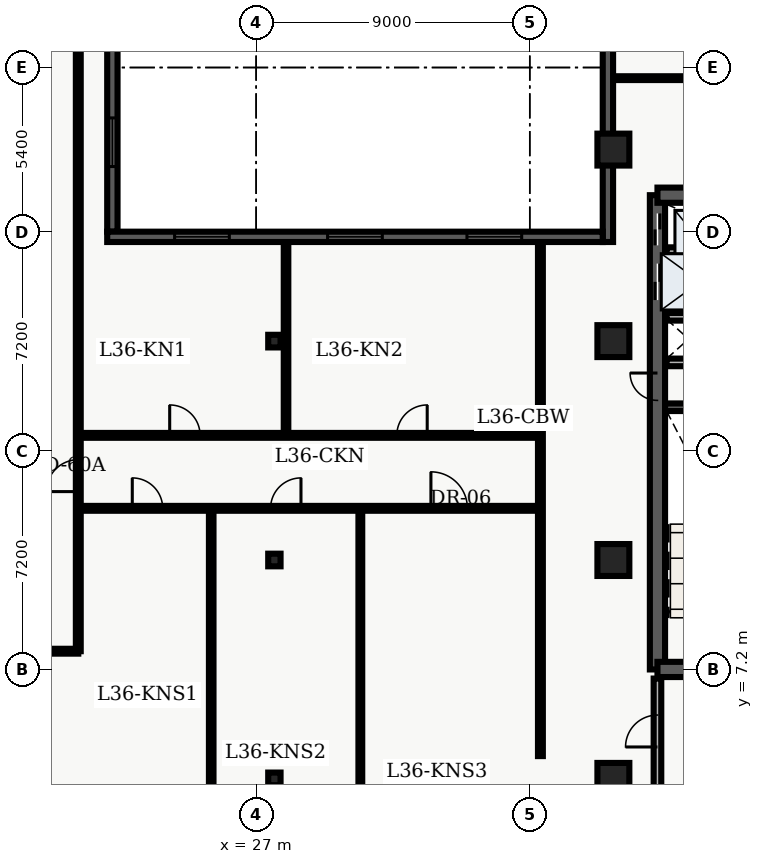
"""IFC4 building model, lengths in metres.
Left out: names, types, materials, properties, quantities, classifications, styles, units other than length and angle.
Written with IfcOpenShell. Run it as: python <this file> out.ifc"""

import sys

from ifc_helpers import new_model, entity, si_unit, converted_unit, direction, frame, origin_with_axes, origin_2d_with_axis, place, context, subcontext, project, spatial, polyline, rectangle, i_section, outline, extrude, element, fill, save


model = new_model("IFC4")
c1 = context("Model", 3, precision=1e-05, world=origin_with_axes(), true_north=direction((0.0, 1.0)))
c2 = subcontext(c1, "Body", "Model", "MODEL_VIEW")
j1 = project(units=[si_unit("LENGTHUNIT", "METRE"), converted_unit("PLANEANGLEUNIT", "DEGREE", entity("IfcPlaneAngleMeasure", 0.017), si_unit("PLANEANGLEUNIT", "RADIAN"), dimensions=[0, 0, 0, 0, 0, 0, 0])], contexts=[c1])
p1 = place(None, origin_with_axes())
s1 = spatial("IfcSite", under=j1, at=p1, CompositionType="ELEMENT")
p2 = place(p1, origin_with_axes())
s2 = spatial("IfcBuilding", under=s1, at=p2, CompositionType="ELEMENT")
p3 = place(p2, frame((0.0, 0.0, 148.5), z_axis=(0.0, 0.0, 1.0), x_axis=(1.0, 0.0, 0.0)))
s3 = spatial("IfcBuildingStorey", under=s2, at=p3, CompositionType="ELEMENT", Elevation=148.5)
p4 = place(p3, frame((40.2, 7.2, 0.0), z_axis=(0.0, 0.0, 1.0), x_axis=(0.0, 1.0, 0.0)))
e1 = element("IfcWall", 1, at=p4, inside=s3, PredefinedType="SHEAR", context=c2, shape_type="SweptSolid", body=[
    extrude(outline(polyline([(0.0, -0.25), (15.6, -0.25), (15.6, 0.25), (0.0, 0.25), (0.0, -0.25)])), origin_with_axes(), (0.0, 0.0, 1.0), 3.66),
])
p5 = place(p4, frame((14.475, 0.0, 0.0), z_axis=(0.0, 0.0, 1.0), x_axis=(1.0, 0.0, 0.0)))
e2 = element("IfcOpeningElement", 2, at=p5, cuts=e1, PredefinedType="OPENING", context=c2, shape_type="SweptSolid", body=[
    extrude(rectangle(XDim=1.05, YDim=0.52, at=origin_2d_with_axis()), origin_with_axes(), (0.0, 0.0, 1.0), 2.15),
])
p6 = place(p4, frame((12.75, 0.0, 0.0), z_axis=(0.0, 0.0, 1.0), x_axis=(1.0, 0.0, 0.0)))
e3 = element("IfcOpeningElement", 3, at=p6, cuts=e1, PredefinedType="OPENING", context=c2, shape_type="SweptSolid", body=[
    extrude(rectangle(XDim=1.2, YDim=0.52, at=origin_2d_with_axis()), origin_with_axes(), (0.0, 0.0, 1.0), 2.15),
])
p7 = place(p4, frame((9.3, 0.0, 0.0), z_axis=(0.0, 0.0, 1.0), x_axis=(1.0, 0.0, 0.0)))
e4 = element("IfcOpeningElement", 4, at=p7, cuts=e1, PredefinedType="OPENING", context=c2, shape_type="SweptSolid", body=[
    extrude(rectangle(XDim=0.9, YDim=0.52, at=origin_2d_with_axis()), origin_with_axes(), (0.0, 0.0, 1.0), 2.15),
])
p8 = place(p3, frame((40.2, 7.2, 0.0), z_axis=(0.0, 0.0, 1.0), x_axis=(1.0, 0.0, 0.0)))
e5 = element("IfcWall", 5, at=p8, inside=s3, PredefinedType="SHEAR", context=c2, shape_type="SweptSolid", body=[
    extrude(outline(polyline([(0.0, -0.25), (7.85, -0.25), (7.85, 0.25), (0.0, 0.25), (0.0, -0.25)])), origin_with_axes(), (0.0, 0.0, 1.0), 3.66),
])
p9 = place(p8, frame((2.175, 0.0, 0.0), z_axis=(0.0, 0.0, 1.0), x_axis=(1.0, 0.0, 0.0)))
e6 = element("IfcOpeningElement", 6, at=p9, cuts=e5, PredefinedType="OPENING", context=c2, shape_type="SweptSolid", body=[
    extrude(rectangle(XDim=1.05, YDim=0.52, at=origin_2d_with_axis()), origin_with_axes(), (0.0, 0.0, 1.0), 2.15),
])
p10 = place(p3, frame((40.2, 22.8, 0.0), z_axis=(0.0, 0.0, 1.0), x_axis=(1.0, 0.0, 0.0)))
e7 = element("IfcWall", 7, at=p10, inside=s3, PredefinedType="SHEAR", context=c2, shape_type="SweptSolid", body=[
    extrude(outline(polyline([(0.0, -0.25), (7.85, -0.25), (7.85, 0.25), (0.0, 0.25), (0.0, -0.25)])), origin_with_axes(), (0.0, 0.0, 1.0), 3.66),
])
p11 = place(p10, frame((5.775, 0.0, 0.0), z_axis=(0.0, 0.0, 1.0), x_axis=(1.0, 0.0, 0.0)))
e8 = element("IfcOpeningElement", 8, at=p11, cuts=e7, PredefinedType="OPENING", context=c2, shape_type="SweptSolid", body=[
    extrude(rectangle(XDim=1.05, YDim=0.52, at=origin_2d_with_axis()), origin_with_axes(), (0.0, 0.0, 1.0), 2.15),
])
p12 = place(p3, frame((40.45, 15.825, 0.0), z_axis=(0.0, 0.0, 1.0), x_axis=(1.0, 0.0, 0.0)))
e9 = element("IfcWall", 9, at=p12, inside=s3, PredefinedType="SHEAR", context=c2, shape_type="SweptSolid", body=[
    extrude(outline(polyline([(0.0, -0.125), (3.55, -0.125), (3.55, 0.125), (0.0, 0.125), (0.0, -0.125)])), origin_with_axes(), (0.0, 0.0, 1.0), 3.66),
])
p13 = place(p3, frame((40.5, 17.3, 0.0), z_axis=(0.0, 0.0, 1.0), x_axis=(1.0, 0.0, 0.0)))
e10 = element("IfcWall", 10, at=p13, inside=s3, PredefinedType="SOLIDWALL", context=c2, shape_type="SweptSolid", body=[
    extrude(outline(polyline([(0.0, -0.125), (3.5, -0.125), (3.5, 0.125), (0.0, 0.125), (0.0, -0.125)])), origin_with_axes(), (0.0, 0.0, 1.0), 2.7),
])
p14 = place(p13, frame((2.4, 0.0, 0.0), z_axis=(0.0, 0.0, 1.0), x_axis=(1.0, 0.0, 0.0)))
e11 = element("IfcOpeningElement", 11, at=p14, cuts=e10, PredefinedType="OPENING", context=c2, shape_type="SweptSolid", body=[
    extrude(rectangle(XDim=0.9, YDim=0.27, at=origin_2d_with_axis()), origin_with_axes(), (0.0, 0.0, 1.0), 2.15),
])
p15 = place(p3, frame((40.5, 18.8, 0.0), z_axis=(0.0, 0.0, 1.0), x_axis=(1.0, 0.0, 0.0)))
e12 = element("IfcWall", 12, at=p15, inside=s3, PredefinedType="SOLIDWALL", context=c2, shape_type="SweptSolid", body=[
    extrude(outline(polyline([(0.0, -0.125), (3.5, -0.125), (3.5, 0.125), (0.0, 0.125), (0.0, -0.125)])), origin_with_axes(), (0.0, 0.0, 1.0), 2.7),
])
p16 = place(p3, frame((40.2, 3.1, 0.0), z_axis=(0.0, 0.0, 1.0), x_axis=(0.0, 1.0, 0.0)))
e13 = element("IfcWall", 13, at=p16, inside=s3, PredefinedType="SOLIDWALL", context=c2, shape_type="SweptSolid", body=[
    extrude(outline(polyline([(0.0, -0.125), (3.8, -0.125), (3.8, 0.125), (0.0, 0.125), (0.0, -0.125)])), origin_with_axes(), (0.0, 0.0, 1.0), 2.7),
])
p17 = place(p16, frame((2.075, 0.0, 0.0), z_axis=(0.0, 0.0, 1.0), x_axis=(1.0, 0.0, 0.0)))
e14 = element("IfcOpeningElement", 14, at=p17, cuts=e13, PredefinedType="OPENING", context=c2, shape_type="SweptSolid", body=[
    extrude(rectangle(XDim=1.05, YDim=0.27, at=origin_2d_with_axis()), origin_with_axes(), (0.0, 0.0, 1.0), 2.15),
])
for number, where, z_axis, x_axis in (
    (15, (27.6, 3.6, 0.0), (0.0, 0.0, 1.0), (1.0, 0.0, 0.0)),
    (16, (27.6, 10.8, 0.0), (0.0, 0.0, 1.0), (1.0, 0.0, 0.0)),
    (17, (27.6, 18.0, 0.0), (0.0, 0.0, 1.0), (1.0, 0.0, 0.0)),
):
    element("IfcColumn", number, at=place(p3, frame(where, z_axis=z_axis, x_axis=x_axis)), inside=s3, PredefinedType="COLUMN", context=c2, shape_type="SweptSolid", body=[
        extrude(i_section(OverallWidth=0.406, OverallDepth=0.416, WebThickness=0.03, FlangeThickness=0.048, FilletRadius=0.022, at=origin_2d_with_axis()), origin_with_axes(), (0.0, 0.0, 1.0), 3.9),
    ])
for number, where, z_axis, x_axis in (
    (18, (38.75, 3.6, 0.0), (0.0, 0.0, 1.0), (1.0, 0.0, 0.0)),
    (19, (38.75, 10.8, 0.0), (0.0, 0.0, 1.0), (1.0, 0.0, 0.0)),
    (20, (38.75, 18.0, 0.0), (0.0, 0.0, 1.0), (1.0, 0.0, 0.0)),
    (21, (38.75, 24.3, 0.0), (0.0, 0.0, 1.0), (1.0, 0.0, 0.0)),
):
    element("IfcColumn", number, at=place(p3, frame(where, z_axis=z_axis, x_axis=x_axis)), inside=s3, PredefinedType="COLUMN", context=c2, shape_type="SweptSolid", body=[
        extrude(rectangle(XDim=1.05, YDim=1.05, at=origin_2d_with_axis()), origin_with_axes(), (0.0, 0.0, 1.0), 3.9),
    ])
p18 = place(p3, frame((40.5, 20.96, 0.0), z_axis=(0.0, 0.0, 1.0), x_axis=(1.0, 0.0, 0.0)))
e22 = element("IfcWall", 22, at=p18, inside=s3, PredefinedType="SOLIDWALL", context=c2, shape_type="SweptSolid", body=[
    extrude(outline(polyline([(0.0, -0.125), (3.5, -0.125), (3.5, 0.125), (0.0, 0.125), (0.0, -0.125)])), origin_with_axes(), (0.0, 0.0, 1.0), 2.7),
])
p19 = place(p3, frame((2.6, 7.8, 0.0), z_axis=(0.0, 0.0, 1.0), x_axis=(1.0, 0.0, 0.0)))
e23 = element("IfcWall", 23, at=p19, inside=s3, PredefinedType="PARTITIONING", context=c2, shape_type="SweptSolid", body=[
    extrude(outline(polyline([(0.0, -0.08), (18.55, -0.08), (18.55, 0.08), (0.0, 0.08), (0.0, -0.08)])), origin_with_axes(), (0.0, 0.0, 1.0), 2.7),
])
p20 = place(p19, frame((3.737, 0.0, 0.0), z_axis=(0.0, 0.0, 1.0), x_axis=(1.0, 0.0, 0.0)))
e24 = element("IfcOpeningElement", 24, at=p20, cuts=e23, PredefinedType="OPENING", context=c2, shape_type="SweptSolid", body=[
    extrude(rectangle(XDim=1.0, YDim=0.18, at=origin_2d_with_axis()), origin_with_axes(), (0.0, 0.0, 1.0), 2.15),
])
p21 = place(p19, frame((13.273, 0.0, 0.0), z_axis=(0.0, 0.0, 1.0), x_axis=(1.0, 0.0, 0.0)))
e25 = element("IfcOpeningElement", 25, at=p21, cuts=e23, PredefinedType="OPENING", context=c2, shape_type="SweptSolid", body=[
    extrude(rectangle(XDim=1.0, YDim=0.18, at=origin_2d_with_axis()), origin_with_axes(), (0.0, 0.0, 1.0), 2.15),
])
p22 = place(p3, frame((21.15, 7.8, 0.0), z_axis=(0.0, 0.0, 1.0), x_axis=(0.0, 1.0, 0.0)))
e26 = element("IfcWall", 26, at=p22, inside=s3, PredefinedType="PARTITIONING", context=c2, shape_type="SweptSolid", body=[
    extrude(outline(polyline([(0.0, -0.08), (32.7, -0.08), (32.7, 0.08), (0.0, 0.08), (0.0, -0.08)])), origin_with_axes(), (0.0, 0.0, 1.0), 2.7),
])
p23 = place(p22, frame((5.775, 0.0, 0.0), z_axis=(0.0, 0.0, 1.0), x_axis=(1.0, 0.0, 0.0)))
e27 = element("IfcOpeningElement", 27, at=p23, cuts=e26, PredefinedType="OPENING", context=c2, shape_type="SweptSolid", body=[
    extrude(rectangle(XDim=1.05, YDim=0.18, at=origin_2d_with_axis()), origin_with_axes(), (0.0, 0.0, 1.0), 2.15),
])
p24 = place(p3, frame((21.15, 12.5, 0.0), z_axis=(0.0, 0.0, 1.0), x_axis=(1.0, 0.0, 0.0)))
e28 = element("IfcWall", 28, at=p24, inside=s3, PredefinedType="PARTITIONING", context=c2, shape_type="SweptSolid", body=[
    extrude(outline(polyline([(0.0, -0.08), (15.2, -0.08), (15.2, 0.08), (0.0, 0.08), (0.0, -0.08)])), origin_with_axes(), (0.0, 0.0, 1.0), 2.7),
])
p25 = place(p24, frame((2.276, 0.0, 0.0), z_axis=(0.0, 0.0, 1.0), x_axis=(1.0, 0.0, 0.0)))
e29 = element("IfcOpeningElement", 29, at=p25, cuts=e28, PredefinedType="OPENING", context=c2, shape_type="SweptSolid", body=[
    extrude(rectangle(XDim=1.0, YDim=0.18, at=origin_2d_with_axis()), origin_with_axes(), (0.0, 0.0, 1.0), 2.15),
])
p26 = place(p24, frame((6.824, 0.0, 0.0), z_axis=(0.0, 0.0, 1.0), x_axis=(1.0, 0.0, 0.0)))
e30 = element("IfcOpeningElement", 30, at=p26, cuts=e28, PredefinedType="OPENING", context=c2, shape_type="SweptSolid", body=[
    extrude(rectangle(XDim=1.0, YDim=0.18, at=origin_2d_with_axis()), origin_with_axes(), (0.0, 0.0, 1.0), 2.15),
])
p27 = place(p24, frame((12.198, 0.0, 0.0), z_axis=(0.0, 0.0, 1.0), x_axis=(1.0, 0.0, 0.0)))
e31 = element("IfcOpeningElement", 31, at=p27, cuts=e28, PredefinedType="OPENING", context=c2, shape_type="SweptSolid", body=[
    extrude(rectangle(XDim=1.2, YDim=0.18, at=origin_2d_with_axis()), origin_with_axes(), (0.0, 0.0, 1.0), 2.2),
])
p28 = place(p3, frame((21.15, 14.9, 0.0), z_axis=(0.0, 0.0, 1.0), x_axis=(1.0, 0.0, 0.0)))
e32 = element("IfcWall", 32, at=p28, inside=s3, PredefinedType="PARTITIONING", context=c2, shape_type="SweptSolid", body=[
    extrude(outline(polyline([(0.0, -0.08), (15.2, -0.08), (15.2, 0.08), (0.0, 0.08), (0.0, -0.08)])), origin_with_axes(), (0.0, 0.0, 1.0), 2.7),
])
p29 = place(p28, frame((3.506, 0.0, 0.0), z_axis=(0.0, 0.0, 1.0), x_axis=(1.0, 0.0, 0.0)))
e33 = element("IfcOpeningElement", 33, at=p29, cuts=e32, PredefinedType="OPENING", context=c2, shape_type="SweptSolid", body=[
    extrude(rectangle(XDim=1.0, YDim=0.18, at=origin_2d_with_axis()), origin_with_axes(), (0.0, 0.0, 1.0), 2.15),
])
p30 = place(p28, frame((10.976, 0.0, 0.0), z_axis=(0.0, 0.0, 1.0), x_axis=(1.0, 0.0, 0.0)))
e34 = element("IfcOpeningElement", 34, at=p30, cuts=e32, PredefinedType="OPENING", context=c2, shape_type="SweptSolid", body=[
    extrude(rectangle(XDim=1.0, YDim=0.18, at=origin_2d_with_axis()), origin_with_axes(), (0.0, 0.0, 1.0), 2.15),
])
p31 = place(p3, frame((36.35, 4.35, 0.0), z_axis=(0.0, 0.0, 1.0), x_axis=(0.0, 1.0, 0.0)))
e35 = element("IfcWall", 35, at=p31, inside=s3, PredefinedType="PARTITIONING", context=c2, shape_type="SweptSolid", body=[
    extrude(outline(polyline([(0.0, -0.08), (16.95, -0.08), (16.95, 0.08), (0.0, 0.08), (0.0, -0.08)])), origin_with_axes(), (0.0, 0.0, 1.0), 2.7),
])
p32 = place(p3, frame((25.522, 0.335, 0.0), z_axis=(0.0, 0.0, 1.0), x_axis=(0.0, 1.0, 0.0)))
e36 = element("IfcWall", 36, at=p32, inside=s3, PredefinedType="PARTITIONING", context=c2, shape_type="SweptSolid", body=[
    extrude(outline(polyline([(0.0, -0.075), (12.045, -0.075), (12.045, 0.075), (0.0, 0.075), (0.0, -0.075)])), origin_with_axes(), (0.0, 0.0, 1.0), 2.7),
])
p33 = place(p3, frame((30.427, 0.335, 0.0), z_axis=(0.0, 0.0, 1.0), x_axis=(0.0, 1.0, 0.0)))
e37 = element("IfcWall", 37, at=p33, inside=s3, PredefinedType="PARTITIONING", context=c2, shape_type="SweptSolid", body=[
    extrude(outline(polyline([(0.0, -0.062), (12.045, -0.062), (12.045, 0.062), (0.0, 0.062), (0.0, -0.062)])), origin_with_axes(), (0.0, 0.0, 1.0), 2.7),
])
p34 = place(p3, frame((27.983, 15.02, 0.0), z_axis=(0.0, 0.0, 1.0), x_axis=(0.0, 1.0, 0.0)))
e38 = element("IfcWall", 38, at=p34, inside=s3, PredefinedType="PARTITIONING", context=c2, shape_type="SweptSolid", body=[
    extrude(outline(polyline([(0.0, -0.075), (6.245, -0.075), (6.245, 0.075), (0.0, 0.075), (0.0, -0.075)])), origin_with_axes(), (0.0, 0.0, 1.0), 2.7),
])
p35 = place(p3, frame((38.735, 26.65, 0.0), z_axis=(0.0, 0.0, 1.0), x_axis=(1.0, 0.0, 0.0)))
e39 = element("IfcWall", 39, at=p35, inside=s3, PredefinedType="PARTITIONING", context=c2, shape_type="SweptSolid", body=[
    extrude(outline(polyline([(0.0, -0.062), (20.905, -0.062), (20.905, 0.062), (0.0, 0.062), (0.0, -0.062)])), origin_with_axes(), (0.0, 0.0, 1.0), 2.7),
])
p36 = place(p35, frame((4.265, 0.0, 0.0), z_axis=(0.0, 0.0, 1.0), x_axis=(1.0, 0.0, 0.0)))
e40 = element("IfcOpeningElement", 40, at=p36, cuts=e39, PredefinedType="OPENING", context=c2, shape_type="SweptSolid", body=[
    extrude(rectangle(XDim=1.0, YDim=0.145, at=origin_2d_with_axis()), origin_with_axes(), (0.0, 0.0, 1.0), 2.15),
])
p37 = place(p3, frame((38.57, 21.26, 0.0), z_axis=(0.0, 0.0, 1.0), x_axis=(0.0, 1.0, 0.0)))
e41 = element("IfcWall", 41, at=p37, inside=s3, PredefinedType="SOLIDWALL", context=c2, shape_type="SweptSolid", body=[
    extrude(outline(polyline([(0.0, -0.17), (7.54, -0.17), (7.54, 0.17), (0.0, 0.17), (0.0, -0.17)])), origin_with_axes(), (0.0, 0.0, 1.0), 3.66),
])
p38 = place(p3, frame((22.271, 46.22, 0.0), z_axis=(0.0, 0.0, 1.0), x_axis=(0.0, -1.0, 0.0)))
e42 = element("IfcWall", 42, at=p38, inside=s3, PredefinedType="SOLIDWALL", context=c2, shape_type="SweptSolid", body=[
    extrude(outline(polyline([(0.0, -0.17), (24.62, -0.17), (24.62, 0.17), (0.0, 0.17), (0.0, -0.17)])), origin_with_axes(), (0.0, 0.0, 1.0), 3.66),
])
p39 = place(p38, frame((2.942, 0.0, 0.45), z_axis=(0.0, 0.0, 1.0), x_axis=(1.0, 0.0, 0.0)))
e43 = element("IfcOpeningElement", 43, at=p39, cuts=e42, PredefinedType="OPENING", context=c2, shape_type="SweptSolid", body=[
    extrude(rectangle(XDim=1.6, YDim=0.36, at=origin_2d_with_axis()), origin_with_axes(), (0.0, 0.0, 1.0), 2.2),
])
p40 = place(p38, frame((7.626, 0.0, 0.45), z_axis=(0.0, 0.0, 1.0), x_axis=(1.0, 0.0, 0.0)))
e44 = element("IfcOpeningElement", 44, at=p40, cuts=e42, PredefinedType="OPENING", context=c2, shape_type="SweptSolid", body=[
    extrude(rectangle(XDim=1.6, YDim=0.36, at=origin_2d_with_axis()), origin_with_axes(), (0.0, 0.0, 1.0), 2.2),
])
p41 = place(p38, frame((12.31, 0.0, 0.45), z_axis=(0.0, 0.0, 1.0), x_axis=(1.0, 0.0, 0.0)))
e45 = element("IfcOpeningElement", 45, at=p41, cuts=e42, PredefinedType="OPENING", context=c2, shape_type="SweptSolid", body=[
    extrude(rectangle(XDim=1.6, YDim=0.36, at=origin_2d_with_axis()), origin_with_axes(), (0.0, 0.0, 1.0), 2.2),
])
p42 = place(p38, frame((16.994, 0.0, 0.45), z_axis=(0.0, 0.0, 1.0), x_axis=(1.0, 0.0, 0.0)))
e46 = element("IfcOpeningElement", 46, at=p42, cuts=e42, PredefinedType="OPENING", context=c2, shape_type="SweptSolid", body=[
    extrude(rectangle(XDim=1.6, YDim=0.36, at=origin_2d_with_axis()), origin_with_axes(), (0.0, 0.0, 1.0), 2.2),
])
p43 = place(p38, frame((21.678, 0.0, 0.45), z_axis=(0.0, 0.0, 1.0), x_axis=(1.0, 0.0, 0.0)))
e47 = element("IfcOpeningElement", 47, at=p43, cuts=e42, PredefinedType="OPENING", context=c2, shape_type="SweptSolid", body=[
    extrude(rectangle(XDim=1.6, YDim=0.36, at=origin_2d_with_axis()), origin_with_axes(), (0.0, 0.0, 1.0), 2.2),
])
p44 = place(p3, frame((22.101, 21.43, 0.0), z_axis=(0.0, 0.0, 1.0), x_axis=(1.0, 0.0, 0.0)))
e48 = element("IfcWall", 48, at=p44, inside=s3, PredefinedType="SOLIDWALL", context=c2, shape_type="SweptSolid", body=[
    extrude(outline(polyline([(0.0, -0.17), (16.299, -0.17), (16.299, 0.17), (0.0, 0.17), (0.0, -0.17)])), origin_with_axes(), (0.0, 0.0, 1.0), 3.66),
])
p45 = place(p44, frame((3.117, 0.0, 0.45), z_axis=(0.0, 0.0, 1.0), x_axis=(1.0, 0.0, 0.0)))
e49 = element("IfcOpeningElement", 49, at=p45, cuts=e48, PredefinedType="OPENING", context=c2, shape_type="SweptSolid", body=[
    extrude(rectangle(XDim=1.8, YDim=0.36, at=origin_2d_with_axis()), origin_with_axes(), (0.0, 0.0, 1.0), 2.1),
])
p46 = place(p44, frame((8.149, 0.0, 0.45), z_axis=(0.0, 0.0, 1.0), x_axis=(1.0, 0.0, 0.0)))
e50 = element("IfcOpeningElement", 50, at=p46, cuts=e48, PredefinedType="OPENING", context=c2, shape_type="SweptSolid", body=[
    extrude(rectangle(XDim=1.8, YDim=0.36, at=origin_2d_with_axis()), origin_with_axes(), (0.0, 0.0, 1.0), 2.1),
])
p47 = place(p44, frame((12.733, 0.0, 0.45), z_axis=(0.0, 0.0, 1.0), x_axis=(1.0, 0.0, 0.0)))
e51 = element("IfcOpeningElement", 51, at=p47, cuts=e48, PredefinedType="OPENING", context=c2, shape_type="SweptSolid", body=[
    extrude(rectangle(XDim=1.8, YDim=0.36, at=origin_2d_with_axis()), origin_with_axes(), (0.0, 0.0, 1.0), 2.1),
])
p48 = place(p4, frame((14.475, 0.0, 0.0), z_axis=(0.0, 0.0, 1.0), x_axis=(1.0, 0.0, 0.0)))
e52 = element("IfcDoor", 52, at=p48, inside=s3, OperationType="SLIDING_TO_RIGHT", PredefinedType="DOOR", context=c2, shape_type="SweptSolid", body=[
    extrude(rectangle(XDim=1.05, YDim=0.09, at=origin_2d_with_axis()), origin_with_axes(), (0.0, 0.0, 1.0), 2.15),
])
fill(e2, e52)
p49 = place(p4, frame((12.75, 0.0, 0.0), z_axis=(0.0, 0.0, 1.0), x_axis=(1.0, 0.0, 0.0)))
e53 = element("IfcDoor", 53, at=p49, inside=s3, OperationType="DOUBLE_DOOR_SLIDING", PredefinedType="DOOR", context=c2, shape_type="SweptSolid", body=[
    extrude(rectangle(XDim=1.2, YDim=0.09, at=origin_2d_with_axis()), origin_with_axes(), (0.0, 0.0, 1.0), 2.15),
])
fill(e3, e53)
p50 = place(p4, frame((9.3, 0.0, 0.0), z_axis=(0.0, 0.0, 1.0), x_axis=(1.0, 0.0, 0.0)))
e54 = element("IfcDoor", 54, at=p50, inside=s3, OperationType="SINGLE_SWING_RIGHT", PredefinedType="DOOR", context=c2, shape_type="SweptSolid", body=[
    extrude(rectangle(XDim=0.9, YDim=0.09, at=origin_2d_with_axis()), origin_with_axes(), (0.0, 0.0, 1.0), 2.15),
])
fill(e4, e54)
p51 = place(p16, frame((2.075, 0.0, 0.0), z_axis=(0.0, 0.0, 1.0), x_axis=(1.0, 0.0, 0.0)))
e55 = element("IfcDoor", 55, at=p51, inside=s3, OperationType="SINGLE_SWING_LEFT", PredefinedType="DOOR", context=c2, shape_type="SweptSolid", body=[
    extrude(rectangle(XDim=1.05, YDim=0.09, at=origin_2d_with_axis()), origin_with_axes(), (0.0, 0.0, 1.0), 2.15),
])
fill(e14, e55)
p52 = place(p22, frame((5.775, 0.0, 0.0), z_axis=(0.0, 0.0, 1.0), x_axis=(1.0, 0.0, 0.0)))
e56 = element("IfcDoor", 56, at=p52, inside=s3, OperationType="SINGLE_SWING_LEFT", PredefinedType="DOOR", context=c2, shape_type="SweptSolid", body=[
    extrude(rectangle(XDim=1.05, YDim=0.09, at=origin_2d_with_axis()), origin_with_axes(), (0.0, 0.0, 1.0), 2.15),
])
fill(e27, e56)
p53 = place(p24, frame((2.276, 0.0, 0.0), z_axis=(0.0, 0.0, 1.0), x_axis=(1.0, 0.0, 0.0)))
e57 = element("IfcDoor", 57, at=p53, inside=s3, OperationType="SINGLE_SWING_LEFT", PredefinedType="DOOR", context=c2, shape_type="SweptSolid", body=[
    extrude(rectangle(XDim=1.0, YDim=0.09, at=origin_2d_with_axis()), origin_with_axes(), (0.0, 0.0, 1.0), 2.15),
])
fill(e29, e57)
p54 = place(p24, frame((6.824, 0.0, 0.0), z_axis=(0.0, 0.0, 1.0), x_axis=(1.0, 0.0, 0.0)))
e58 = element("IfcDoor", 58, at=p54, inside=s3, OperationType="SINGLE_SWING_RIGHT", PredefinedType="DOOR", context=c2, shape_type="SweptSolid", body=[
    extrude(rectangle(XDim=1.0, YDim=0.09, at=origin_2d_with_axis()), origin_with_axes(), (0.0, 0.0, 1.0), 2.15),
])
fill(e30, e58)
p55 = place(p24, frame((12.198, 0.0, 0.0), z_axis=(0.0, 0.0, 1.0), x_axis=(1.0, 0.0, 0.0)))
e59 = element("IfcDoor", 59, at=p55, inside=s3, OperationType="SINGLE_SWING_LEFT", PredefinedType="DOOR", context=c2, shape_type="SweptSolid", body=[
    extrude(rectangle(XDim=1.2, YDim=0.09, at=origin_2d_with_axis()), origin_with_axes(), (0.0, 0.0, 1.0), 2.2),
])
fill(e31, e59)
p56 = place(p28, frame((3.506, 0.0, 0.0), z_axis=(0.0, 0.0, 1.0), x_axis=(1.0, 0.0, 0.0)))
e60 = element("IfcDoor", 60, at=p56, inside=s3, OperationType="SINGLE_SWING_LEFT", PredefinedType="DOOR", context=c2, shape_type="SweptSolid", body=[
    extrude(rectangle(XDim=1.0, YDim=0.09, at=origin_2d_with_axis()), origin_with_axes(), (0.0, 0.0, 1.0), 2.15),
])
fill(e33, e60)
p57 = place(p28, frame((10.976, 0.0, 0.0), z_axis=(0.0, 0.0, 1.0), x_axis=(1.0, 0.0, 0.0)))
e61 = element("IfcDoor", 61, at=p57, inside=s3, OperationType="SINGLE_SWING_RIGHT", PredefinedType="DOOR", context=c2, shape_type="SweptSolid", body=[
    extrude(rectangle(XDim=1.0, YDim=0.09, at=origin_2d_with_axis()), origin_with_axes(), (0.0, 0.0, 1.0), 2.15),
])
fill(e34, e61)
p58 = place(p38, frame((21.678, 0.0, 0.45), z_axis=(0.0, 0.0, 1.0), x_axis=(1.0, 0.0, 0.0)))
e62 = element("IfcWindow", 62, at=p58, inside=s3, PredefinedType="WINDOW", context=c2, shape_type="SweptSolid", body=[
    extrude(rectangle(XDim=1.6, YDim=0.09, at=origin_2d_with_axis()), origin_with_axes(), (0.0, 0.0, 1.0), 2.2),
])
fill(e47, e62)
p59 = place(p44, frame((3.117, 0.0, 0.45), z_axis=(0.0, 0.0, 1.0), x_axis=(1.0, 0.0, 0.0)))
e63 = element("IfcWindow", 63, at=p59, inside=s3, PredefinedType="WINDOW", context=c2, shape_type="SweptSolid", body=[
    extrude(rectangle(XDim=1.8, YDim=0.09, at=origin_2d_with_axis()), origin_with_axes(), (0.0, 0.0, 1.0), 2.1),
])
fill(e49, e63)
p60 = place(p44, frame((8.149, 0.0, 0.45), z_axis=(0.0, 0.0, 1.0), x_axis=(1.0, 0.0, 0.0)))
e64 = element("IfcWindow", 64, at=p60, inside=s3, PredefinedType="WINDOW", context=c2, shape_type="SweptSolid", body=[
    extrude(rectangle(XDim=1.8, YDim=0.09, at=origin_2d_with_axis()), origin_with_axes(), (0.0, 0.0, 1.0), 2.1),
])
fill(e50, e64)
p61 = place(p44, frame((12.733, 0.0, 0.45), z_axis=(0.0, 0.0, 1.0), x_axis=(1.0, 0.0, 0.0)))
e65 = element("IfcWindow", 65, at=p61, inside=s3, PredefinedType="WINDOW", context=c2, shape_type="SweptSolid", body=[
    extrude(rectangle(XDim=1.8, YDim=0.09, at=origin_2d_with_axis()), origin_with_axes(), (0.0, 0.0, 1.0), 2.1),
])
fill(e51, e65)
save(model, sys.argv[1])
